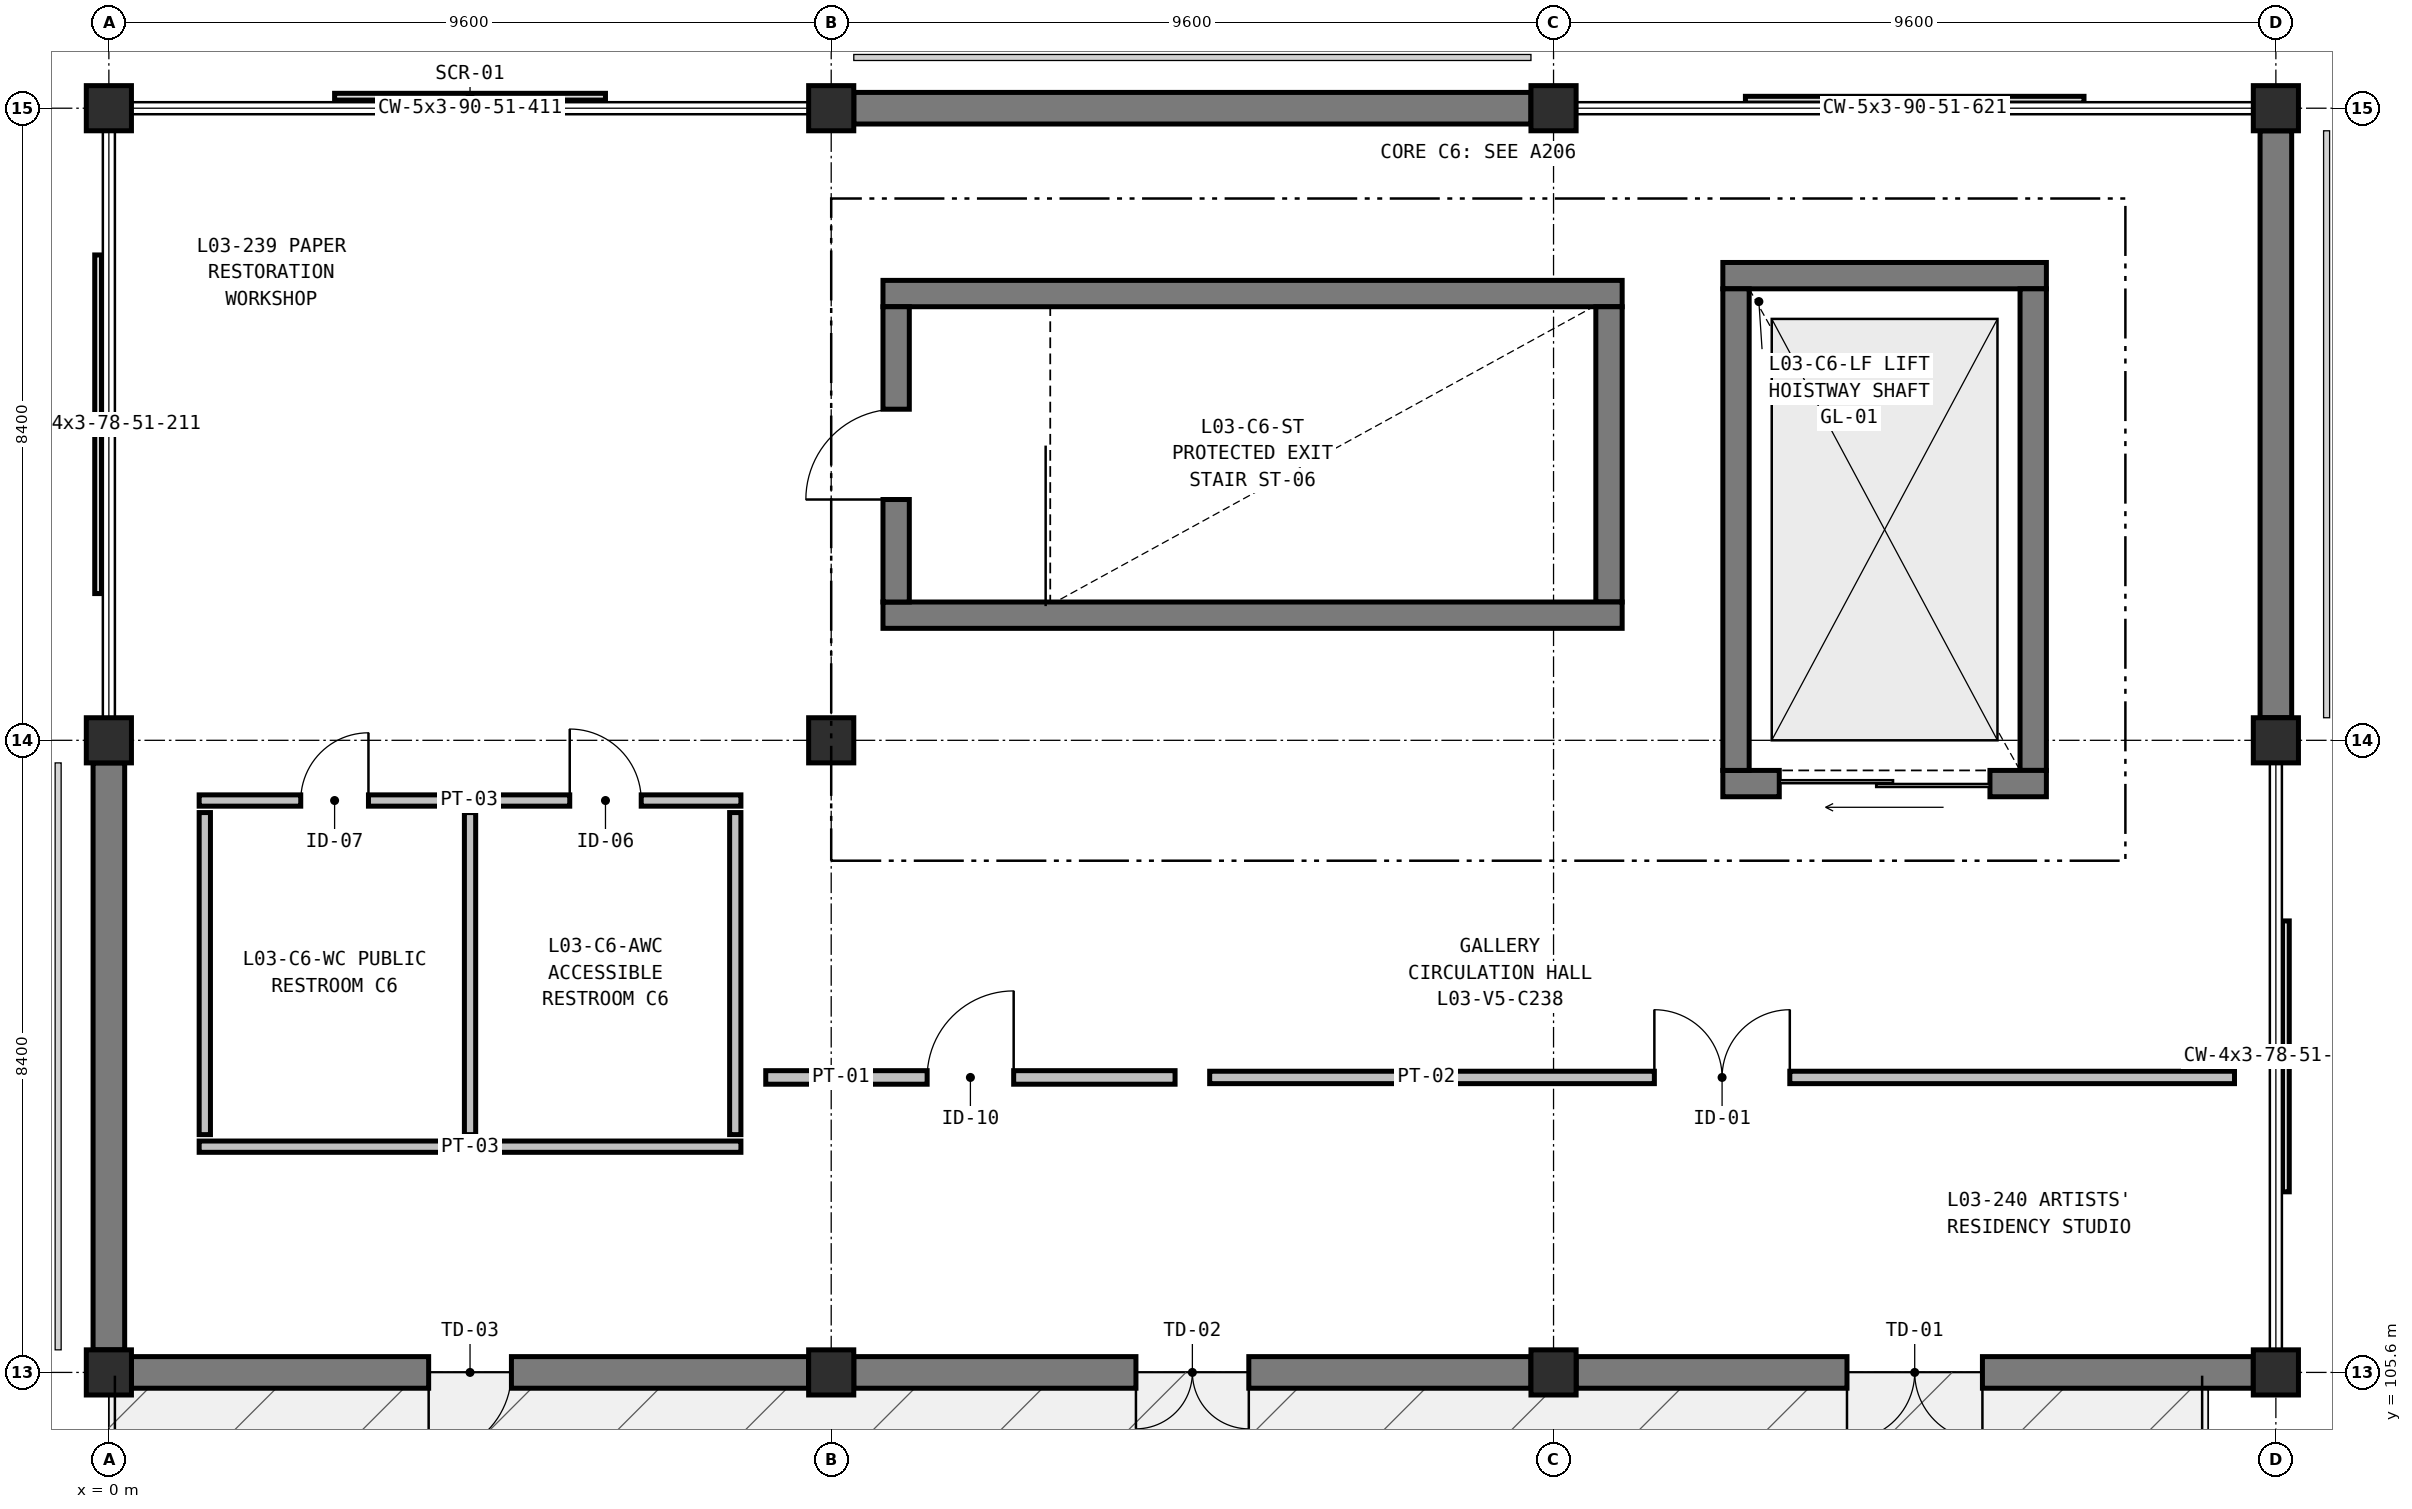
"""IFC4 building model, lengths in metres.
Left out: names, types, materials, properties, quantities, classifications, styles, units other than length and angle.
Written with IfcOpenShell. Run it as: python <this file> out.ifc"""

import sys

from ifc_helpers import new_model, si_unit, direction, frame, frame_2d, origin, origin_2d, place, context, subcontext, project, spatial, rectangle, extrude, element, fill, save


model = new_model("IFC4")
c1 = context("Model", 3, precision=1e-05, world=origin(), true_north=direction((0.0, 1.0)))
c2 = subcontext(c1, "Body", "Model", "MODEL_VIEW")
j1 = project(units=[si_unit("LENGTHUNIT", "METRE"), si_unit("PLANEANGLEUNIT", "RADIAN")], contexts=[c1])
p1 = place(None, origin())
s1 = spatial("IfcSite", under=j1, at=p1, CompositionType="ELEMENT")
p2 = place(p1, origin())
s2 = spatial("IfcBuilding", under=s1, at=p2, CompositionType="ELEMENT")
p3 = place(p2, frame((0.0, 0.0, 16.8)))
s3 = spatial("IfcBuildingStorey", under=s2, at=p3, CompositionType="ELEMENT", Elevation=16.8)
for number, where, z_axis, x_axis in (
    (1, (0.0, 105.6, 0.0), (0.0, 0.0, 1.0), (1.0, 0.0, 0.0)),
    (2, (0.0, 114.0, 0.0), (0.0, 0.0, 1.0), (1.0, 0.0, 0.0)),
    (3, (0.0, 122.4, 0.0), (0.0, 0.0, 1.0), (1.0, 0.0, 0.0)),
    (4, (9.6, 105.6, 0.0), (0.0, 0.0, 1.0), (1.0, 0.0, 0.0)),
    (5, (9.6, 114.0, 0.0), (0.0, 0.0, 1.0), (1.0, 0.0, 0.0)),
    (6, (9.6, 122.4, 0.0), (0.0, 0.0, 1.0), (1.0, 0.0, 0.0)),
    (7, (19.2, 105.6, 0.0), (0.0, 0.0, 1.0), (1.0, 0.0, 0.0)),
    (8, (19.2, 122.4, 0.0), (0.0, 0.0, 1.0), (1.0, 0.0, 0.0)),
    (9, (28.8, 105.6, 0.0), (0.0, 0.0, 1.0), (1.0, 0.0, 0.0)),
    (10, (28.8, 114.0, 0.0), (0.0, 0.0, 1.0), (1.0, 0.0, 0.0)),
    (11, (28.8, 122.4, 0.0), (0.0, 0.0, 1.0), (1.0, 0.0, 0.0)),
):
    element("IfcColumn", number, at=place(p3, frame(where, z_axis=z_axis, x_axis=x_axis)), inside=s3, PredefinedType="COLUMN", context=c2, shape_type="SweptSolid", body=[
        extrude(rectangle(XDim=0.6, YDim=0.6, at=origin_2d()), origin(), (0.0, 0.0, 1.0), 5.4),
    ])
p4 = place(p3, frame((9.9, 122.4, 0.0), z_axis=(0.0, 0.0, 1.0), x_axis=(1.0, 0.0, 0.0)))
e12 = element("IfcWall", 12, at=p4, inside=s3, PredefinedType="SOLIDWALL", context=c2, shape_type="SweptSolid", body=[
    extrude(rectangle(XDim=9.0, YDim=0.42, at=frame_2d((4.5, 0.0))), origin(), (0.0, 0.0, 1.0), 5.1),
])
p5 = place(p3, frame((28.8, 122.1, 0.0), z_axis=(0.0, 0.0, 1.0), x_axis=(0.0, -1.0, 0.0)))
e13 = element("IfcWall", 13, at=p5, inside=s3, PredefinedType="SOLIDWALL", context=c2, shape_type="SweptSolid", body=[
    extrude(rectangle(XDim=7.8, YDim=0.42, at=frame_2d((3.9, 0.0))), origin(), (0.0, 0.0, 1.0), 5.1),
])
p6 = place(p3, frame((28.5, 105.6, 0.0), z_axis=(0.0, 0.0, 1.0), x_axis=(-1.0, 0.0, 0.0)))
e14 = element("IfcWall", 14, at=p6, inside=s3, PredefinedType="SOLIDWALL", context=c2, shape_type="SweptSolid", body=[
    extrude(rectangle(XDim=9.0, YDim=0.42, at=frame_2d((4.5, 0.0))), origin(), (0.0, 0.0, 1.0), 5.1),
])
p7 = place(p6, frame((3.6, 0.0, 0.0)))
e15 = element("IfcOpeningElement", 15, at=p7, cuts=e14, PredefinedType="OPENING", context=c2, shape_type="SweptSolid", body=[
    extrude(rectangle(XDim=1.8, YDim=2.3, at=frame_2d((0.9, 1.15))), frame((0.0, 0.22, 0.0), z_axis=(0.0, -1.0, 0.0), x_axis=(1.0, 0.0, 0.0)), (0.0, 0.0, 1.0), 0.44),
])
p8 = place(p3, frame((18.9, 105.6, 0.0), z_axis=(0.0, 0.0, 1.0), x_axis=(-1.0, 0.0, 0.0)))
e16 = element("IfcWall", 16, at=p8, inside=s3, PredefinedType="SOLIDWALL", context=c2, shape_type="SweptSolid", body=[
    extrude(rectangle(XDim=9.0, YDim=0.42, at=frame_2d((4.5, 0.0))), origin(), (0.0, 0.0, 1.0), 5.1),
])
p9 = place(p8, frame((3.75, 0.0, 0.0)))
e17 = element("IfcOpeningElement", 17, at=p9, cuts=e16, PredefinedType="OPENING", context=c2, shape_type="SweptSolid", body=[
    extrude(rectangle(XDim=1.5, YDim=2.25, at=frame_2d((0.75, 1.125))), frame((0.0, 0.22, 0.0), z_axis=(0.0, -1.0, 0.0), x_axis=(1.0, 0.0, 0.0)), (0.0, 0.0, 1.0), 0.44),
])
p10 = place(p3, frame((9.3, 105.6, 0.0), z_axis=(0.0, 0.0, 1.0), x_axis=(-1.0, 0.0, 0.0)))
e18 = element("IfcWall", 18, at=p10, inside=s3, PredefinedType="SOLIDWALL", context=c2, shape_type="SweptSolid", body=[
    extrude(rectangle(XDim=9.0, YDim=0.42, at=frame_2d((4.5, 0.0))), origin(), (0.0, 0.0, 1.0), 5.1),
])
p11 = place(p10, frame((3.95, 0.0, 0.0)))
e19 = element("IfcOpeningElement", 19, at=p11, cuts=e18, PredefinedType="OPENING", context=c2, shape_type="SweptSolid", body=[
    extrude(rectangle(XDim=1.1, YDim=2.2, at=frame_2d((0.55, 1.1))), frame((0.0, 0.22, 0.0), z_axis=(0.0, -1.0, 0.0), x_axis=(1.0, 0.0, 0.0)), (0.0, 0.0, 1.0), 0.44),
])
p12 = place(p3, frame((0.0, 105.9, 0.0), z_axis=(0.0, 0.0, 1.0), x_axis=(0.0, 1.0, 0.0)))
e20 = element("IfcWall", 20, at=p12, inside=s3, PredefinedType="SOLIDWALL", context=c2, shape_type="SweptSolid", body=[
    extrude(rectangle(XDim=7.8, YDim=0.42, at=frame_2d((3.9, 0.0))), origin(), (0.0, 0.0, 1.0), 5.1),
])
p13 = place(p3, frame((10.288, 119.937, 0.0), z_axis=(0.0, 0.0, 1.0), x_axis=(1.0, 0.0, 0.0)))
e21 = element("IfcWall", 21, at=p13, inside=s3, PredefinedType="SHEAR", context=c2, shape_type="SweptSolid", body=[
    extrude(rectangle(XDim=9.824, YDim=0.35, at=frame_2d((4.912, 0.0))), origin(), (0.0, 0.0, 1.0), 5.1),
])
p14 = place(p3, frame((19.937, 119.762, 0.0), z_axis=(0.0, 0.0, 1.0), x_axis=(0.0, -1.0, 0.0)))
e22 = element("IfcWall", 22, at=p14, inside=s3, PredefinedType="SHEAR", context=c2, shape_type="SweptSolid", body=[
    extrude(rectangle(XDim=3.924, YDim=0.35, at=frame_2d((1.962, 0.0))), origin(), (0.0, 0.0, 1.0), 5.1),
])
p15 = place(p3, frame((20.112, 115.663, 0.0), z_axis=(0.0, 0.0, 1.0), x_axis=(-1.0, 0.0, 0.0)))
e23 = element("IfcWall", 23, at=p15, inside=s3, PredefinedType="SHEAR", context=c2, shape_type="SweptSolid", body=[
    extrude(rectangle(XDim=9.824, YDim=0.35, at=frame_2d((4.912, 0.0))), origin(), (0.0, 0.0, 1.0), 5.1),
])
p16 = place(p3, frame((10.463, 115.838, 0.0), z_axis=(0.0, 0.0, 1.0), x_axis=(0.0, 1.0, 0.0)))
e24 = element("IfcWall", 24, at=p16, inside=s3, PredefinedType="SHEAR", context=c2, shape_type="SweptSolid", body=[
    extrude(rectangle(XDim=3.924, YDim=0.35, at=frame_2d((1.962, 0.0))), origin(), (0.0, 0.0, 1.0), 5.1),
])
p17 = place(p16, frame((1.362, 0.0, 0.0)))
e25 = element("IfcOpeningElement", 25, at=p17, cuts=e24, PredefinedType="OPENING", context=c2, shape_type="SweptSolid", body=[
    extrude(rectangle(XDim=1.2, YDim=2.2, at=frame_2d((0.6, 1.1))), frame((0.0, 0.185, 0.0), z_axis=(0.0, -1.0, 0.0), x_axis=(1.0, 0.0, 0.0)), (0.0, 0.0, 1.0), 0.37),
])
p18 = place(p3, frame((21.45, 120.175, 0.0), z_axis=(0.0, 0.0, 1.0), x_axis=(1.0, 0.0, 0.0)))
e26 = element("IfcWall", 26, at=p18, inside=s3, PredefinedType="SHEAR", context=c2, shape_type="SweptSolid", body=[
    extrude(rectangle(XDim=4.3, YDim=0.35, at=frame_2d((2.15, 0.0))), origin(), (0.0, 0.0, 1.0), 5.1),
])
p19 = place(p3, frame((25.575, 120.0, 0.0), z_axis=(0.0, 0.0, 1.0), x_axis=(0.0, -1.0, 0.0)))
e27 = element("IfcWall", 27, at=p19, inside=s3, PredefinedType="SHEAR", context=c2, shape_type="SweptSolid", body=[
    extrude(rectangle(XDim=6.4, YDim=0.35, at=frame_2d((3.2, 0.0))), origin(), (0.0, 0.0, 1.0), 5.1),
])
p20 = place(p3, frame((25.75, 113.425, 0.0), z_axis=(0.0, 0.0, 1.0), x_axis=(-1.0, 0.0, 0.0)))
e28 = element("IfcWall", 28, at=p20, inside=s3, PredefinedType="SHEAR", context=c2, shape_type="SweptSolid", body=[
    extrude(rectangle(XDim=4.3, YDim=0.35, at=frame_2d((2.15, 0.0))), origin(), (0.0, 0.0, 1.0), 5.1),
])
p21 = place(p20, frame((0.75, 0.0, 0.0)))
e29 = element("IfcOpeningElement", 29, at=p21, cuts=e28, PredefinedType="OPENING", context=c2, shape_type="SweptSolid", body=[
    extrude(rectangle(XDim=2.8, YDim=2.7, at=frame_2d((1.4, 1.35))), frame((0.0, 0.185, 0.0), z_axis=(0.0, -1.0, 0.0), x_axis=(1.0, 0.0, 0.0)), (0.0, 0.0, 1.0), 0.37),
])
p22 = place(p3, frame((21.625, 113.6, 0.0), z_axis=(0.0, 0.0, 1.0), x_axis=(0.0, 1.0, 0.0)))
e30 = element("IfcWall", 30, at=p22, inside=s3, PredefinedType="SHEAR", context=c2, shape_type="SweptSolid", body=[
    extrude(rectangle(XDim=6.4, YDim=0.35, at=frame_2d((3.2, 0.0))), origin(), (0.0, 0.0, 1.0), 5.1),
])
p23 = place(p3, frame((1.2, 113.2, 0.0), z_axis=(0.0, 0.0, 1.0), x_axis=(1.0, 0.0, 0.0)))
e31 = element("IfcWall", 31, at=p23, inside=s3, PredefinedType="PARTITIONING", context=c2, shape_type="SweptSolid", body=[
    extrude(rectangle(XDim=7.2, YDim=0.15, at=frame_2d((3.6, 0.0))), origin(), (0.0, 0.0, 1.0), 5.1),
])
p24 = place(p23, frame((1.35, 0.0, 0.0)))
e32 = element("IfcOpeningElement", 32, at=p24, cuts=e31, PredefinedType="OPENING", context=c2, shape_type="SweptSolid", body=[
    extrude(rectangle(XDim=0.9, YDim=2.1, at=frame_2d((0.45, 1.05))), frame((0.0, 0.085, 0.0), z_axis=(0.0, -1.0, 0.0), x_axis=(1.0, 0.0, 0.0)), (0.0, 0.0, 1.0), 0.17),
])
p25 = place(p23, frame((4.925, 0.0, 0.0)))
e33 = element("IfcOpeningElement", 33, at=p25, cuts=e31, PredefinedType="OPENING", context=c2, shape_type="SweptSolid", body=[
    extrude(rectangle(XDim=0.95, YDim=2.15, at=frame_2d((0.475, 1.075))), frame((0.0, 0.085, 0.0), z_axis=(0.0, -1.0, 0.0), x_axis=(1.0, 0.0, 0.0)), (0.0, 0.0, 1.0), 0.17),
])
p26 = place(p3, frame((1.2, 108.6, 0.0), z_axis=(0.0, 0.0, 1.0), x_axis=(1.0, 0.0, 0.0)))
e34 = element("IfcWall", 34, at=p26, inside=s3, PredefinedType="PARTITIONING", context=c2, shape_type="SweptSolid", body=[
    extrude(rectangle(XDim=7.2, YDim=0.15, at=frame_2d((3.6, 0.0))), origin(), (0.0, 0.0, 1.0), 5.1),
])
for number, where, z_axis, x_axis in (
    (35, (1.275, 108.76, 0.0), (0.0, 0.0, 1.0), (0.0, 1.0, 0.0)),
    (36, (4.8, 108.76, 0.0), (0.0, 0.0, 1.0), (0.0, 1.0, 0.0)),
    (37, (8.325, 108.76, 0.0), (0.0, 0.0, 1.0), (0.0, 1.0, 0.0)),
):
    element("IfcWall", number, at=place(p3, frame(where, z_axis=z_axis, x_axis=x_axis)), inside=s3, PredefinedType="PARTITIONING", context=c2, shape_type="SweptSolid", body=[
        extrude(rectangle(XDim=4.28, YDim=0.15, at=frame_2d((2.14, 0.0))), origin(), (0.0, 0.0, 1.0), 5.1),
    ])
p27 = place(p3, frame((8.73, 109.52, 0.0), z_axis=(0.0, 0.0, 1.0), x_axis=(1.0, 0.0, 0.0)))
e38 = element("IfcWall", 38, at=p27, inside=s3, PredefinedType="PARTITIONING", context=c2, shape_type="SweptSolid", body=[
    extrude(rectangle(XDim=5.44, YDim=0.18, at=frame_2d((2.72, 0.0))), origin(), (0.0, 0.0, 1.0), 5.1),
])
p28 = place(p27, frame((2.145, 0.0, 0.0)))
e39 = element("IfcOpeningElement", 39, at=p28, cuts=e38, PredefinedType="OPENING", context=c2, shape_type="SweptSolid", body=[
    extrude(rectangle(XDim=1.15, YDim=2.2, at=frame_2d((0.575, 1.1))), frame((0.0, 0.1, 0.0), z_axis=(0.0, -1.0, 0.0), x_axis=(1.0, 0.0, 0.0)), (0.0, 0.0, 1.0), 0.2),
])
p29 = place(p3, frame((14.63, 109.52, 0.0), z_axis=(0.0, 0.0, 1.0), x_axis=(1.0, 0.0, 0.0)))
e40 = element("IfcWall", 40, at=p29, inside=s3, PredefinedType="PARTITIONING", context=c2, shape_type="SweptSolid", body=[
    extrude(rectangle(XDim=13.62, YDim=0.165, at=frame_2d((6.81, 0.0))), origin(), (0.0, 0.0, 1.0), 5.1),
])
p30 = place(p29, frame((5.91, 0.0, 0.0)))
e41 = element("IfcOpeningElement", 41, at=p30, cuts=e40, PredefinedType="OPENING", context=c2, shape_type="SweptSolid", body=[
    extrude(rectangle(XDim=1.8, YDim=2.4, at=frame_2d((0.9, 1.2))), frame((0.0, 0.093, 0.0), z_axis=(0.0, -1.0, 0.0), x_axis=(1.0, 0.0, 0.0)), (0.0, 0.0, 1.0), 0.185),
])
p31 = place(p7, origin())
e42 = element("IfcDoor", 42, at=p31, inside=s3, OperationType="DOUBLE_DOOR_SINGLE_SWING", PredefinedType="DOOR", context=c2, shape_type="SweptSolid", body=[
    extrude(rectangle(XDim=1.8, YDim=2.3, at=frame_2d((0.9, 1.15))), frame((0.0, 0.025, 0.0), z_axis=(0.0, -1.0, 0.0), x_axis=(1.0, 0.0, 0.0)), (0.0, 0.0, 1.0), 0.05),
])
fill(e15, e42)
p32 = place(p9, origin())
e43 = element("IfcDoor", 43, at=p32, inside=s3, OperationType="DOUBLE_DOOR_SINGLE_SWING", PredefinedType="DOOR", context=c2, shape_type="SweptSolid", body=[
    extrude(rectangle(XDim=1.5, YDim=2.25, at=frame_2d((0.75, 1.125))), frame((0.0, 0.025, 0.0), z_axis=(0.0, -1.0, 0.0), x_axis=(1.0, 0.0, 0.0)), (0.0, 0.0, 1.0), 0.05),
])
fill(e17, e43)
p33 = place(p11, origin())
e44 = element("IfcDoor", 44, at=p33, inside=s3, OperationType="SINGLE_SWING_RIGHT", PredefinedType="DOOR", context=c2, shape_type="SweptSolid", body=[
    extrude(rectangle(XDim=1.1, YDim=2.2, at=frame_2d((0.55, 1.1))), frame((0.0, 0.025, 0.0), z_axis=(0.0, -1.0, 0.0), x_axis=(1.0, 0.0, 0.0)), (0.0, 0.0, 1.0), 0.05),
])
fill(e19, e44)
p34 = place(p17, origin())
e45 = element("IfcDoor", 45, at=p34, inside=s3, OperationType="SINGLE_SWING_LEFT", PredefinedType="DOOR", context=c2, shape_type="SweptSolid", body=[
    extrude(rectangle(XDim=1.2, YDim=2.2, at=frame_2d((0.6, 1.1))), frame((0.0, 0.025, 0.0), z_axis=(0.0, -1.0, 0.0), x_axis=(1.0, 0.0, 0.0)), (0.0, 0.0, 1.0), 0.05),
])
fill(e25, e45)
p35 = place(p21, origin())
e46 = element("IfcDoor", 46, at=p35, inside=s3, OperationType="DOUBLE_DOOR_SLIDING", PredefinedType="DOOR", context=c2, shape_type="SweptSolid", body=[
    extrude(rectangle(XDim=2.8, YDim=2.7, at=frame_2d((1.4, 1.35))), frame((0.0, 0.025, 0.0), z_axis=(0.0, -1.0, 0.0), x_axis=(1.0, 0.0, 0.0)), (0.0, 0.0, 1.0), 0.05),
])
fill(e29, e46)
p36 = place(p24, origin())
e47 = element("IfcDoor", 47, at=p36, inside=s3, OperationType="SINGLE_SWING_RIGHT", PredefinedType="DOOR", context=c2, shape_type="SweptSolid", body=[
    extrude(rectangle(XDim=0.9, YDim=2.1, at=frame_2d((0.45, 1.05))), frame((0.0, 0.025, 0.0), z_axis=(0.0, -1.0, 0.0), x_axis=(1.0, 0.0, 0.0)), (0.0, 0.0, 1.0), 0.05),
])
fill(e32, e47)
p37 = place(p25, origin())
e48 = element("IfcDoor", 48, at=p37, inside=s3, OperationType="SINGLE_SWING_LEFT", PredefinedType="DOOR", context=c2, shape_type="SweptSolid", body=[
    extrude(rectangle(XDim=0.95, YDim=2.15, at=frame_2d((0.475, 1.075))), frame((0.0, 0.025, 0.0), z_axis=(0.0, -1.0, 0.0), x_axis=(1.0, 0.0, 0.0)), (0.0, 0.0, 1.0), 0.05),
])
fill(e33, e48)
p38 = place(p28, origin())
e49 = element("IfcDoor", 49, at=p38, inside=s3, OperationType="SINGLE_SWING_RIGHT", PredefinedType="DOOR", context=c2, shape_type="SweptSolid", body=[
    extrude(rectangle(XDim=1.15, YDim=2.2, at=frame_2d((0.575, 1.1))), frame((0.0, 0.025, 0.0), z_axis=(0.0, -1.0, 0.0), x_axis=(1.0, 0.0, 0.0)), (0.0, 0.0, 1.0), 0.05),
])
fill(e39, e49)
p39 = place(p30, origin())
e50 = element("IfcDoor", 50, at=p39, inside=s3, OperationType="DOUBLE_DOOR_SINGLE_SWING", PredefinedType="DOOR", context=c2, shape_type="SweptSolid", body=[
    extrude(rectangle(XDim=1.8, YDim=2.4, at=frame_2d((0.9, 1.2))), frame((0.0, 0.025, 0.0), z_axis=(0.0, -1.0, 0.0), x_axis=(1.0, 0.0, 0.0)), (0.0, 0.0, 1.0), 0.05),
])
fill(e41, e50)
save(model, sys.argv[1])
